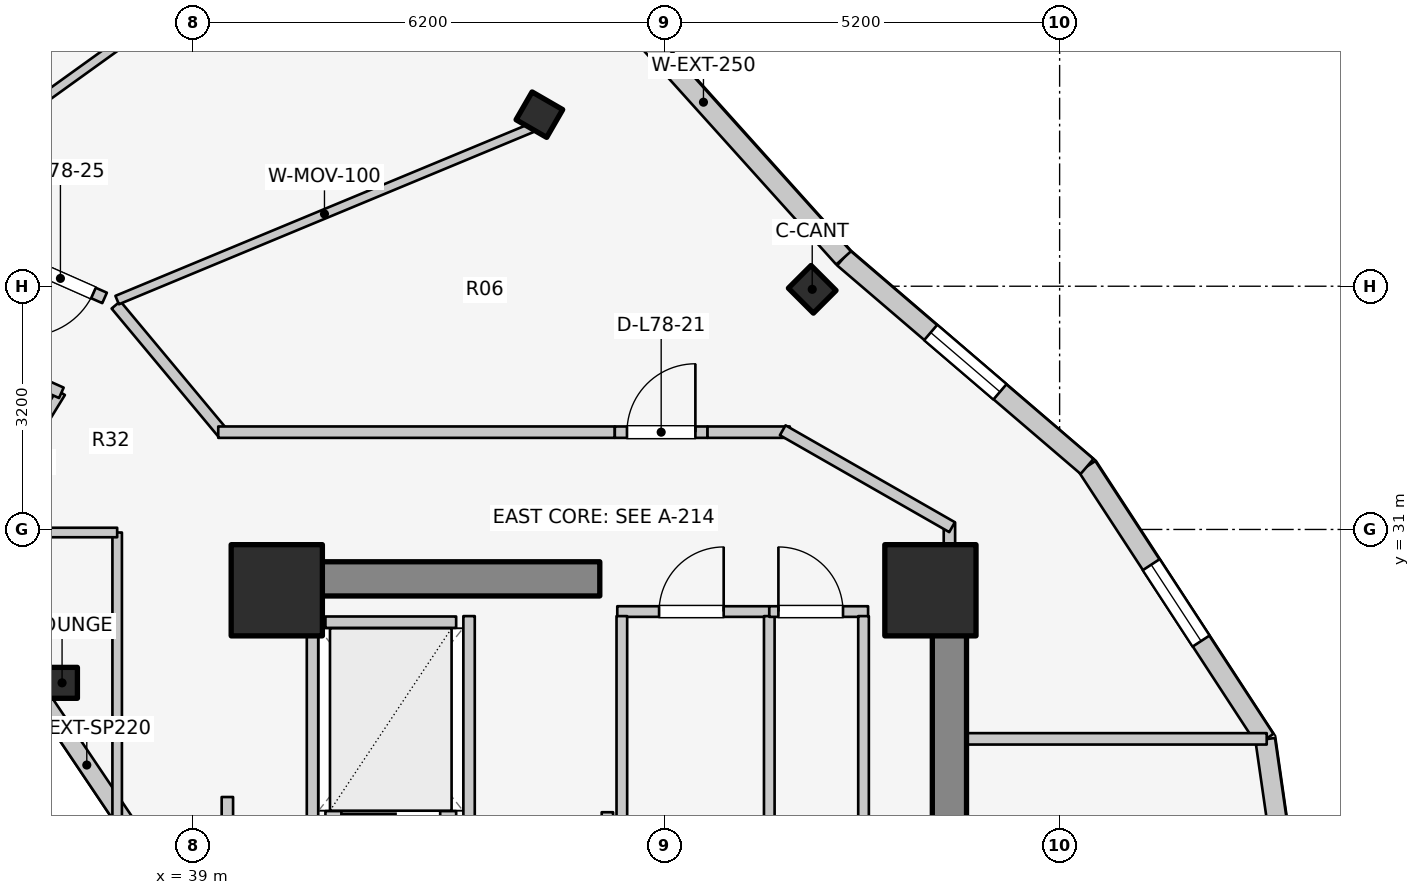
"""IFC4 building model, lengths in metres.
Left out: names, types, materials, properties, quantities, classifications, styles, units other than length and angle.
Written with IfcOpenShell. Run it as: python <this file> out.ifc"""

import sys

from ifc_helpers import new_model, si_unit, direction, frame, frame_2d, origin, origin_2d, place, context, subcontext, project, spatial, rectangle, i_section, extrude, element, fill, save


model = new_model("IFC4")
c1 = context("Model", 3, precision=1e-05, world=origin(), true_north=direction((0.0, 1.0)))
c2 = subcontext(c1, "Body", "Model", "MODEL_VIEW")
j1 = project(units=[si_unit("LENGTHUNIT", "METRE"), si_unit("PLANEANGLEUNIT", "RADIAN")], contexts=[c1])
p1 = place(None, origin())
s1 = spatial("IfcSite", under=j1, at=p1, CompositionType="ELEMENT")
p2 = place(p1, origin())
s2 = spatial("IfcBuilding", under=s1, at=p2, CompositionType="ELEMENT")
p3 = place(p2, frame((0.0, 0.0, 256.8)))
s3 = spatial("IfcBuildingStorey", under=s2, at=p3, CompositionType="ELEMENT", Elevation=256.8)
p4 = place(p3, frame((48.95, 17.05, 0.0), z_axis=(0.0, 0.0, 1.0), x_axis=(0.0, 1.0, 0.0)))
e1 = element("IfcWall", 1, at=p4, inside=s3, PredefinedType="SHEAR", context=c2, shape_type="SweptSolid", body=[
    extrude(rectangle(XDim=12.8, YDim=0.45, at=frame_2d((6.4, 0.0))), origin(), (0.0, 0.0, 1.0), 3.6),
])
p5 = place(p3, frame((39.85, 30.35, 0.0), z_axis=(0.0, 0.0, 1.0), x_axis=(1.0, 0.0, 0.0)))
e2 = element("IfcWall", 2, at=p5, inside=s3, PredefinedType="SHEAR", context=c2, shape_type="SweptSolid", body=[
    extrude(rectangle(XDim=4.5, YDim=0.45, at=frame_2d((2.25, 0.0))), origin(), (0.0, 0.0, 1.0), 3.6),
])
for number, where, z_axis, x_axis in (
    (3, (48.7, 30.2, 0.0), (0.0, 0.0, 1.0), (1.0, 0.0, 0.0)),
    (4, (40.1, 30.2, 0.0), (0.0, 0.0, 1.0), (1.0, 0.0, 0.0)),
):
    element("IfcColumn", number, at=place(p3, frame(where, z_axis=z_axis, x_axis=x_axis)), inside=s3, PredefinedType="COLUMN", context=c2, shape_type="SweptSolid", body=[
        extrude(rectangle(XDim=1.2, YDim=1.2, at=origin_2d()), origin(), (0.0, 0.0, 1.0), 3.6),
    ])
p6 = place(p3, frame((37.275, 28.982, 0.0), z_axis=(0.0, 0.0, 1.0), x_axis=(1.0, 0.0, 0.0)))
e5 = element("IfcColumn", 5, at=p6, inside=s3, PredefinedType="COLUMN", context=c2, shape_type="SweptSolid", body=[
    extrude(i_section(OverallWidth=0.404, OverallDepth=0.407, WebThickness=0.027, FlangeThickness=0.044, FilletRadius=0.025, at=origin_2d()), origin(), (0.0, 0.0, 1.0), 3.6),
])
for number, where, z_axis, x_axis in (
    (6, (47.145, 34.159, 0.0), (0.0, 0.0, 1.0), (0.707, 0.707, 0.0)),
    (7, (43.555, 36.457, 0.0), (0.0, 0.0, 1.0), (0.5, 0.866, 0.0)),
):
    element("IfcColumn", number, at=place(p3, frame(where, z_axis=z_axis, x_axis=x_axis)), inside=s3, PredefinedType="COLUMN", context=c2, shape_type="SweptSolid", body=[
        extrude(i_section(OverallWidth=0.422, OverallDepth=0.465, WebThickness=0.045, FlangeThickness=0.073, FilletRadius=0.025, at=origin_2d()), origin(), (0.0, 0.0, 1.0), 3.6),
    ])
p7 = place(p3, frame((38.166, 27.06, 0.0), z_axis=(0.0, 0.0, 1.0), x_axis=(-0.558197800898, 0.829707909492, 0.0)))
e8 = element("IfcWall", 8, at=p7, inside=s3, PredefinedType="STANDARD", context=c2, shape_type="SweptSolid", body=[
    extrude(rectangle(XDim=2.027, YDim=0.23, at=frame_2d((1.013, 0.0))), origin(), (0.0, 0.0, 1.0), 1.72),
])
p8 = place(p3, frame((53.86, 23.0, 0.0), z_axis=(0.0, 0.0, 1.0), x_axis=(-0.142712754019, 0.989764148593, 0.0)))
e9 = element("IfcWall", 9, at=p8, inside=s3, PredefinedType="STANDARD", context=c2, shape_type="SweptSolid", body=[
    extrude(rectangle(XDim=5.293, YDim=0.26, at=frame_2d((2.646, 0.0))), origin(), (0.0, 0.0, 1.0), 3.07),
])
p9 = place(p8, frame((2.678, 0.0, 0.75)))
e10 = element("IfcOpeningElement", 10, at=p9, cuts=e9, PredefinedType="OPENING", context=c2, shape_type="SweptSolid", body=[
    extrude(rectangle(XDim=1.2, YDim=1.5, at=frame_2d((0.6, 0.75))), frame((0.0, 0.14, 0.0), z_axis=(0.0, -1.0, 0.0), x_axis=(1.0, 0.0, 0.0)), (0.0, 0.0, 1.0), 0.28),
])
p10 = place(p3, frame((53.105, 28.239, 0.0), z_axis=(0.0, 0.0, 1.0), x_axis=(-0.546606419826, 0.837389647539, 0.0)))
e11 = element("IfcWall", 11, at=p10, inside=s3, PredefinedType="STANDARD", context=c2, shape_type="SweptSolid", body=[
    extrude(rectangle(XDim=4.288, YDim=0.26, at=frame_2d((2.144, 0.0))), origin(), (0.0, 0.0, 1.0), 1.72),
])
p11 = place(p10, frame((1.544, 0.0, 0.15)))
e12 = element("IfcOpeningElement", 12, at=p11, cuts=e11, PredefinedType="OPENING", context=c2, shape_type="SweptSolid", body=[
    extrude(rectangle(XDim=1.2, YDim=0.9, at=frame_2d((0.6, 0.45))), frame((0.0, 0.14, 0.0), z_axis=(0.0, -1.0, 0.0), x_axis=(1.0, 0.0, 0.0)), (0.0, 0.0, 1.0), 0.28),
])
p12 = place(p3, frame((50.761, 31.829, 0.0), z_axis=(0.0, 0.0, 1.0), x_axis=(-0.759587504333, 0.650405122413, 0.0)))
e13 = element("IfcWall", 13, at=p12, inside=s3, PredefinedType="STANDARD", context=c2, shape_type="SweptSolid", body=[
    extrude(rectangle(XDim=4.217, YDim=0.26, at=frame_2d((2.109, 0.0))), origin(), (0.0, 0.0, 1.0), 1.72),
])
p13 = place(p12, frame((1.509, 0.0, 0.15)))
e14 = element("IfcOpeningElement", 14, at=p13, cuts=e13, PredefinedType="OPENING", context=c2, shape_type="SweptSolid", body=[
    extrude(rectangle(XDim=1.2, YDim=0.9, at=frame_2d((0.6, 0.45))), frame((0.0, 0.14, 0.0), z_axis=(0.0, -1.0, 0.0), x_axis=(1.0, 0.0, 0.0)), (0.0, 0.0, 1.0), 0.28),
])
p14 = place(p3, frame((47.558, 34.572, 0.0), z_axis=(0.0, 0.0, 1.0), x_axis=(-0.668903560134, 0.743349196031, 0.0)))
e15 = element("IfcWall", 15, at=p14, inside=s3, PredefinedType="STANDARD", context=c2, shape_type="SweptSolid", body=[
    extrude(rectangle(XDim=5.513, YDim=0.26, at=frame_2d((2.756, 0.0))), origin(), (0.0, 0.0, 1.0), 1.72),
])
p15 = place(p3, frame((40.74, 27.22, 0.0), z_axis=(0.0, 0.0, 1.0), x_axis=(1.0, 0.0, 0.0)))
e16 = element("IfcWall", 16, at=p15, inside=s3, PredefinedType="SOLIDWALL", context=c2, shape_type="SweptSolid", body=[
    extrude(rectangle(XDim=1.72, YDim=0.15, at=frame_2d((0.86, 0.0))), origin(), (0.0, 0.0, 1.0), 3.075),
])
p16 = place(p15, frame((0.21, 0.0, 0.0)))
e17 = element("IfcOpeningElement", 17, at=p16, cuts=e16, PredefinedType="OPENING", context=c2, shape_type="SweptSolid", body=[
    extrude(rectangle(XDim=1.3, YDim=2.1, at=frame_2d((0.65, 1.05))), frame((0.0, 0.085, 0.0), z_axis=(0.0, -1.0, 0.0), x_axis=(1.0, 0.0, 0.0)), (0.0, 0.0, 1.0), 0.17),
])
p17 = place(p3, frame((40.74, 29.78, 0.0), z_axis=(0.0, 0.0, 1.0), x_axis=(1.0, 0.0, 0.0)))
e18 = element("IfcWall", 18, at=p17, inside=s3, PredefinedType="SOLIDWALL", context=c2, shape_type="SweptSolid", body=[
    extrude(rectangle(XDim=1.72, YDim=0.15, at=frame_2d((0.86, 0.0))), origin(), (0.0, 0.0, 1.0), 3.075),
])
for number, where, z_axis, x_axis in (
    (19, (40.57, 27.14, 0.0), (0.0, 0.0, 1.0), (0.0, 1.0, 0.0)),
    (20, (42.63, 27.14, 0.0), (0.0, 0.0, 1.0), (0.0, 1.0, 0.0)),
):
    element("IfcWall", number, at=place(p3, frame(where, z_axis=z_axis, x_axis=x_axis)), inside=s3, PredefinedType="SOLIDWALL", context=c2, shape_type="SweptSolid", body=[
        extrude(rectangle(XDim=2.72, YDim=0.15, at=frame_2d((1.36, 0.0))), origin(), (0.0, 0.0, 1.0), 3.075),
    ])
p18 = place(p3, frame((44.45, 24.08, 0.0), z_axis=(0.0, 0.0, 1.0), x_axis=(0.0, 1.0, 0.0)))
e21 = element("IfcWall", 21, at=p18, inside=s3, PredefinedType="PARTITIONING", context=c2, shape_type="SweptSolid", body=[
    extrude(rectangle(XDim=3.2, YDim=0.15, at=frame_2d((1.6, 0.0))), origin(), (0.0, 0.0, 1.0), 3.075),
])
p19 = place(p3, frame((39.45, 24.08, 0.0), z_axis=(0.0, 0.0, 1.0), x_axis=(0.0, 1.0, 0.0)))
e22 = element("IfcWall", 22, at=p19, inside=s3, PredefinedType="PARTITIONING", context=c2, shape_type="SweptSolid", body=[
    extrude(rectangle(XDim=3.4, YDim=0.15, at=frame_2d((1.7, 0.0))), origin(), (0.0, 0.0, 1.0), 3.075),
])
p20 = place(p19, frame((1.894, 0.0, 0.0)))
e23 = element("IfcOpeningElement", 23, at=p20, cuts=e22, PredefinedType="OPENING", context=c2, shape_type="SweptSolid", body=[
    extrude(rectangle(XDim=1.1, YDim=2.1, at=frame_2d((0.55, 1.05))), frame((0.0, 0.085, 0.0), z_axis=(0.0, -1.0, 0.0), x_axis=(1.0, 0.0, 0.0)), (0.0, 0.0, 1.0), 0.17),
])
p21 = place(p3, frame((44.58, 29.92, 0.0), z_axis=(0.0, 0.0, 1.0), x_axis=(1.0, 0.0, 0.0)))
e24 = element("IfcWall", 24, at=p21, inside=s3, PredefinedType="PLUMBINGWALL", context=c2, shape_type="SweptSolid", body=[
    extrude(rectangle(XDim=2.0, YDim=0.14, at=frame_2d((1.0, 0.0))), origin(), (0.0, 0.0, 1.0), 3.075),
])
p22 = place(p21, frame((0.55, 0.0, 0.0)))
e25 = element("IfcOpeningElement", 25, at=p22, cuts=e24, PredefinedType="OPENING", context=c2, shape_type="SweptSolid", body=[
    extrude(rectangle(XDim=0.85, YDim=2.05, at=frame_2d((0.425, 1.025))), frame((0.0, 0.08, 0.0), z_axis=(0.0, -1.0, 0.0), x_axis=(1.0, 0.0, 0.0)), (0.0, 0.0, 1.0), 0.16),
])
for number, where, z_axis, x_axis in (
    (26, (44.64, 25.98, 0.0), (0.0, 0.0, 1.0), (0.0, 1.0, 0.0)),
    (27, (46.58, 25.98, 0.0), (0.0, 0.0, 1.0), (0.0, 1.0, 0.0)),
):
    element("IfcWall", number, at=place(p3, frame(where, z_axis=z_axis, x_axis=x_axis)), inside=s3, PredefinedType="PLUMBINGWALL", context=c2, shape_type="SweptSolid", body=[
        extrude(rectangle(XDim=3.88, YDim=0.14, at=frame_2d((1.94, 0.0))), origin(), (0.0, 0.0, 1.0), 3.075),
    ])
p23 = place(p3, frame((46.58, 29.92, 0.0), z_axis=(0.0, 0.0, 1.0), x_axis=(1.0, 0.0, 0.0)))
e28 = element("IfcWall", 28, at=p23, inside=s3, PredefinedType="PLUMBINGWALL", context=c2, shape_type="SweptSolid", body=[
    extrude(rectangle(XDim=1.3, YDim=0.14, at=frame_2d((0.65, 0.0))), origin(), (0.0, 0.0, 1.0), 3.075),
])
p24 = place(p23, frame((0.12, 0.0, 0.0)))
e29 = element("IfcOpeningElement", 29, at=p24, cuts=e28, PredefinedType="OPENING", context=c2, shape_type="SweptSolid", body=[
    extrude(rectangle(XDim=0.85, YDim=2.05, at=frame_2d((0.425, 1.025))), frame((0.0, 0.08, 0.0), z_axis=(0.0, -1.0, 0.0), x_axis=(1.0, 0.0, 0.0)), (0.0, 0.0, 1.0), 0.16),
])
p25 = place(p3, frame((47.82, 25.98, 0.0), z_axis=(0.0, 0.0, 1.0), x_axis=(0.0, 1.0, 0.0)))
e30 = element("IfcWall", 30, at=p25, inside=s3, PredefinedType="PLUMBINGWALL", context=c2, shape_type="SweptSolid", body=[
    extrude(rectangle(XDim=3.88, YDim=0.14, at=frame_2d((1.94, 0.0))), origin(), (0.0, 0.0, 1.0), 3.075),
])
p26 = place(p3, frame((35.55, 30.015, 0.0), z_axis=(0.0, 0.0, 1.0), x_axis=(0.522763432117, 0.852477796802, 0.0)))
e31 = element("IfcWall", 31, at=p26, inside=s3, PredefinedType="PARTITIONING", context=c2, shape_type="SweptSolid", body=[
    extrude(rectangle(XDim=3.269, YDim=0.125, at=frame_2d((1.635, 0.0))), origin(), (0.0, 0.0, 1.0), 1.72),
])
p27 = place(p3, frame((37.265, 32.798, 0.0), z_axis=(0.0, 0.0, 1.0), x_axis=(-0.913254317828, 0.407389924971, 0.0)))
e32 = element("IfcWall", 32, at=p27, inside=s3, PredefinedType="PARTITIONING", context=c2, shape_type="SweptSolid", body=[
    extrude(rectangle(XDim=2.787, YDim=0.15, at=frame_2d((1.393, 0.0))), origin(), (0.0, 0.0, 1.0), 1.72),
])
p28 = place(p3, frame((38.0, 25.8, 0.0), z_axis=(0.0, 0.0, 1.0), x_axis=(0.0, 1.0, 0.0)))
e33 = element("IfcWall", 33, at=p28, inside=s3, PredefinedType="PARTITIONING", context=c2, shape_type="SweptSolid", body=[
    extrude(rectangle(XDim=5.16, YDim=0.125, at=frame_2d((2.58, 0.0))), origin(), (0.0, 0.0, 1.0), 2.452),
])
p29 = place(p3, frame((35.4, 30.96, 0.0), z_axis=(0.0, 0.0, 1.0), x_axis=(1.0, 0.0, 0.0)))
e34 = element("IfcWall", 34, at=p29, inside=s3, PredefinedType="PARTITIONING", context=c2, shape_type="SweptSolid", body=[
    extrude(rectangle(XDim=2.6, YDim=0.125, at=frame_2d((1.3, 0.0))), origin(), (0.0, 0.0, 1.0), 1.72),
])
p30 = place(p3, frame((48.95, 28.245, 0.0), z_axis=(0.0, 0.0, 1.0), x_axis=(1.0, 0.0, 0.0)))
e35 = element("IfcWall", 35, at=p30, inside=s3, PredefinedType="PARTITIONING", context=c2, shape_type="SweptSolid", body=[
    extrude(rectangle(XDim=4.175, YDim=0.15, at=frame_2d((2.087, 0.0))), origin(), (0.0, 0.0, 1.0), 3.075),
])
p31 = place(p3, frame((48.95, 29.8, 0.0), z_axis=(0.0, 0.0, 1.0), x_axis=(0.0, 1.0, 0.0)))
e36 = element("IfcWall", 36, at=p31, inside=s3, PredefinedType="PARTITIONING", context=c2, shape_type="SweptSolid", body=[
    extrude(rectangle(XDim=1.29, YDim=0.15, at=frame_2d((0.645, 0.0))), origin(), (0.0, 0.0, 1.0), 1.72),
])
p32 = place(p3, frame((37.984, 33.955, 0.0), z_axis=(0.0, 0.0, 1.0), x_axis=(0.64030392053, -0.76812166312, 0.0)))
e37 = element("IfcWall", 37, at=p32, inside=s3, PredefinedType="PARTITIONING", context=c2, shape_type="SweptSolid", body=[
    extrude(rectangle(XDim=2.21, YDim=0.15, at=frame_2d((1.105, 0.0))), origin(), (0.0, 0.0, 1.0), 1.72),
])
p33 = place(p3, frame((39.33, 32.28, 0.0), z_axis=(0.0, 0.0, 1.0), x_axis=(1.0, 0.0, 0.0)))
e38 = element("IfcWall", 38, at=p33, inside=s3, PredefinedType="PARTITIONING", context=c2, shape_type="SweptSolid", body=[
    extrude(rectangle(XDim=5.218, YDim=0.15, at=frame_2d((2.609, 0.0))), origin(), (0.0, 0.0, 1.0), 1.72),
])
p34 = place(p3, frame((44.548, 32.28, 0.0), z_axis=(0.0, 0.0, 1.0), x_axis=(1.0, 0.0, 0.0)))
e39 = element("IfcWall", 39, at=p34, inside=s3, PredefinedType="PARTITIONING", context=c2, shape_type="SweptSolid", body=[
    extrude(rectangle(XDim=1.22, YDim=0.15, at=frame_2d((0.61, 0.0))), origin(), (0.0, 0.0, 1.0), 2.16),
])
p35 = place(p34, frame((0.16, 0.0, 0.0)))
e40 = element("IfcOpeningElement", 40, at=p35, cuts=e39, PredefinedType="OPENING", context=c2, shape_type="SweptSolid", body=[
    extrude(rectangle(XDim=0.9, YDim=2.1, at=frame_2d((0.45, 1.05))), frame((0.0, 0.085, 0.0), z_axis=(0.0, -1.0, 0.0), x_axis=(1.0, 0.0, 0.0)), (0.0, 0.0, 1.0), 0.17),
])
p36 = place(p3, frame((45.768, 32.28, 0.0), z_axis=(0.0, 0.0, 1.0), x_axis=(1.0, 0.0, 0.0)))
e41 = element("IfcWall", 41, at=p36, inside=s3, PredefinedType="PARTITIONING", context=c2, shape_type="SweptSolid", body=[
    extrude(rectangle(XDim=1.083, YDim=0.15, at=frame_2d((0.541, 0.0))), origin(), (0.0, 0.0, 1.0), 3.075),
])
p37 = place(p3, frame((46.757, 32.305, 0.0), z_axis=(0.0, 0.0, 1.0), x_axis=(0.867991349648, -0.496579315857, 0.0)))
e42 = element("IfcWall", 42, at=p37, inside=s3, PredefinedType="PARTITIONING", context=c2, shape_type="SweptSolid", body=[
    extrude(rectangle(XDim=2.567, YDim=0.15, at=frame_2d((1.283, 0.0))), origin(), (0.0, 0.0, 1.0), 1.72),
])
p38 = place(p3, frame((38.0, 34.018, 0.0), z_axis=(0.0, 0.0, 1.0), x_axis=(0.92349333748, 0.383614462228, 0.0)))
e43 = element("IfcWall", 43, at=p38, inside=s3, PredefinedType="MOVABLE", context=c2, shape_type="SweptSolid", body=[
    extrude(rectangle(XDim=5.907, YDim=0.12, at=frame_2d((2.954, 0.0))), origin(), (0.0, 0.0, 1.0), 1.72),
])
p39 = place(p3, frame((35.124, 35.297, 0.0), z_axis=(0.0, 0.0, 1.0), x_axis=(0.811745719064, 0.584011033783, 0.0)))
e44 = element("IfcWall", 44, at=p39, inside=s3, PredefinedType="MOVABLE", context=c2, shape_type="SweptSolid", body=[
    extrude(rectangle(XDim=4.534, YDim=0.12, at=frame_2d((2.267, 0.0))), origin(), (0.0, 0.0, 1.0), 1.72),
])
p40 = place(p3, frame((37.834, 34.046, 0.0), z_axis=(0.0, 0.0, 1.0), x_axis=(-0.914641976237, 0.404264833129, 0.0)))
e45 = element("IfcWall", 45, at=p40, inside=s3, PredefinedType="PARTITIONING", context=c2, shape_type="SweptSolid", body=[
    extrude(rectangle(XDim=1.27, YDim=0.15, at=frame_2d((0.635, 0.0))), origin(), (0.0, 0.0, 1.0), 2.16),
])
p41 = place(p40, frame((0.16, 0.0, 0.0)))
e46 = element("IfcOpeningElement", 46, at=p41, cuts=e45, PredefinedType="OPENING", context=c2, shape_type="SweptSolid", body=[
    extrude(rectangle(XDim=0.95, YDim=2.1, at=frame_2d((0.475, 1.05))), frame((0.0, 0.085, 0.0), z_axis=(0.0, -1.0, 0.0), x_axis=(1.0, 0.0, 0.0)), (0.0, 0.0, 1.0), 0.17),
])
p42 = place(p11, origin())
e47 = element("IfcWindow", 47, at=p42, inside=s3, PartitioningType="SINGLE_PANEL", PredefinedType="WINDOW", context=c2, shape_type="SweptSolid", body=[
    extrude(rectangle(XDim=1.2, YDim=0.9, at=frame_2d((0.6, 0.45))), frame((0.0, 0.03, 0.0), z_axis=(0.0, -1.0, 0.0), x_axis=(1.0, 0.0, 0.0)), (0.0, 0.0, 1.0), 0.06),
])
fill(e12, e47)
p43 = place(p13, origin())
e48 = element("IfcWindow", 48, at=p43, inside=s3, PartitioningType="SINGLE_PANEL", PredefinedType="WINDOW", context=c2, shape_type="SweptSolid", body=[
    extrude(rectangle(XDim=1.2, YDim=0.9, at=frame_2d((0.6, 0.45))), frame((0.0, 0.03, 0.0), z_axis=(0.0, -1.0, 0.0), x_axis=(1.0, 0.0, 0.0)), (0.0, 0.0, 1.0), 0.06),
])
fill(e14, e48)
p44 = place(p22, origin())
e49 = element("IfcDoor", 49, at=p44, inside=s3, OperationType="SINGLE_SWING_RIGHT", PredefinedType="DOOR", context=c2, shape_type="SweptSolid", body=[
    extrude(rectangle(XDim=0.85, YDim=2.05, at=frame_2d((0.425, 1.025))), frame((0.0, 0.025, 0.0), z_axis=(0.0, -1.0, 0.0), x_axis=(1.0, 0.0, 0.0)), (0.0, 0.0, 1.0), 0.05),
])
fill(e25, e49)
p45 = place(p24, origin())
e50 = element("IfcDoor", 50, at=p45, inside=s3, OperationType="SINGLE_SWING_LEFT", PredefinedType="DOOR", context=c2, shape_type="SweptSolid", body=[
    extrude(rectangle(XDim=0.85, YDim=2.05, at=frame_2d((0.425, 1.025))), frame((0.0, 0.025, 0.0), z_axis=(0.0, -1.0, 0.0), x_axis=(1.0, 0.0, 0.0)), (0.0, 0.0, 1.0), 0.05),
])
fill(e29, e50)
p46 = place(p35, origin())
e51 = element("IfcDoor", 51, at=p46, inside=s3, OperationType="SINGLE_SWING_RIGHT", PredefinedType="DOOR", context=c2, shape_type="SweptSolid", body=[
    extrude(rectangle(XDim=0.9, YDim=2.1, at=frame_2d((0.45, 1.05))), frame((0.0, 0.025, 0.0), z_axis=(0.0, -1.0, 0.0), x_axis=(1.0, 0.0, 0.0)), (0.0, 0.0, 1.0), 0.05),
])
fill(e40, e51)
p47 = place(p41, origin())
e52 = element("IfcDoor", 52, at=p47, inside=s3, OperationType="SINGLE_SWING_RIGHT", PredefinedType="DOOR", context=c2, shape_type="SweptSolid", body=[
    extrude(rectangle(XDim=0.95, YDim=2.1, at=frame_2d((0.475, 1.05))), frame((0.0, 0.025, 0.0), z_axis=(0.0, -1.0, 0.0), x_axis=(1.0, 0.0, 0.0)), (0.0, 0.0, 1.0), 0.05),
])
fill(e46, e52)
save(model, sys.argv[1])
